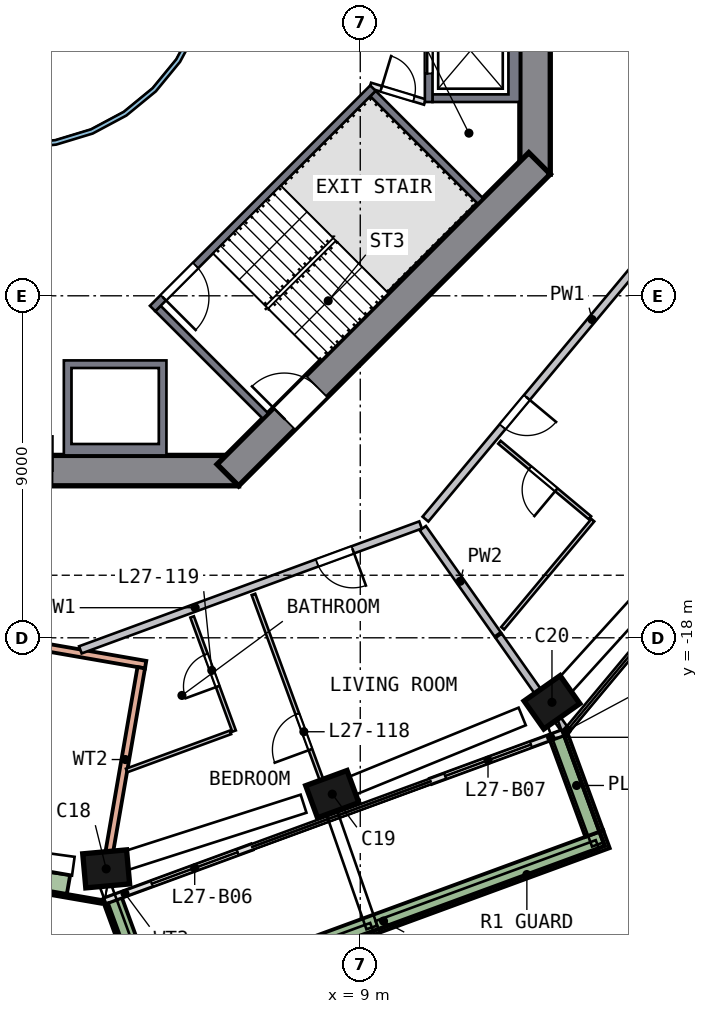
"""IFC4 building model, lengths in metres.
Left out: names, types, materials, properties, quantities, classifications, styles, units other than length and angle.
Written with IfcOpenShell. Run it as: python <this file> out.ifc"""

import sys

from ifc_helpers import new_model, si_unit, direction, frame, frame_2d, origin, origin_2d, place, context, subcontext, project, spatial, polyline, rectangle, outline, extrude, element, fill, save


model = new_model("IFC4")
c1 = context("Model", 3, precision=1e-05, world=origin(), true_north=direction((0.0, 1.0)))
c2 = subcontext(c1, "Body", "Model", "MODEL_VIEW")
j1 = project(units=[si_unit("LENGTHUNIT", "METRE"), si_unit("PLANEANGLEUNIT", "RADIAN")], contexts=[c1])
p1 = place(None, origin())
s1 = spatial("IfcSite", under=j1, at=p1, CompositionType="ELEMENT")
p2 = place(p1, origin())
s2 = spatial("IfcBuilding", under=s1, at=p2, CompositionType="ELEMENT")
p3 = place(p2, frame((0.0, 0.0, 115.0)))
s3 = spatial("IfcBuildingStorey", under=s2, at=p3, CompositionType="ELEMENT", Elevation=115.0)
p4 = place(p3, frame((2.176, -24.094, 0.0), z_axis=(0.114495653, 0.011251897, 0.993360026), x_axis=(-0.989387353, -0.088756673, 0.115043115)))
e1 = element("IfcColumn", 1, at=p4, inside=s3, PredefinedType="COLUMN", context=c2, shape_type="SweptSolid", body=[
    extrude(rectangle(XDim=1.15, YDim=0.9, at=origin_2d()), origin(), (0.0, 0.0, 1.0), 3.211),
])
p5 = place(p3, frame((8.136, -22.162, 0.0), z_axis=(0.105101688, 0.039546221, 0.993674862), x_axis=(0.932955243, 0.342030908, -0.11229146)))
e2 = element("IfcColumn", 2, at=p5, inside=s3, PredefinedType="COLUMN", context=c2, shape_type="SweptSolid", body=[
    extrude(rectangle(XDim=1.15, YDim=0.9, at=origin_2d()), origin(), (0.0, 0.0, 1.0), 3.21),
])
p6 = place(p3, frame((13.932, -19.779, 0.0), z_axis=(0.093512147, 0.067055052, 0.993357488), x_axis=(-0.812148283, -0.571992313, 0.115065024)))
e3 = element("IfcColumn", 3, at=p6, inside=s3, PredefinedType="COLUMN", context=c2, shape_type="SweptSolid", body=[
    extrude(rectangle(XDim=1.15, YDim=0.9, at=origin_2d()), origin(), (0.0, 0.0, 1.0), 3.211),
])
p7 = place(p3, frame((13.6, -5.799, 0.0), z_axis=(0.0, 0.0, 1.0), x_axis=(0.0, 1.0, 0.0)))
e4 = element("IfcWall", 4, at=p7, inside=s3, PredefinedType="SHEAR", context=c2, shape_type="SweptSolid", body=[
    extrude(rectangle(XDim=11.598, YDim=0.8, at=frame_2d((5.799, 0.0))), origin(), (0.0, 0.0, 1.0), 3.5),
])
p8 = place(p7, frame((4.899, 0.0, 0.0)))
e5 = element("IfcOpeningElement", 5, at=p8, cuts=e4, PredefinedType="OPENING", context=c2, shape_type="SweptSolid", body=[
    extrude(rectangle(XDim=1.8, YDim=2.1, at=frame_2d((0.9, 1.05))), frame((0.0, 0.41, 0.0), z_axis=(0.0, -1.0, 0.0), x_axis=(1.0, 0.0, 0.0)), (0.0, 0.0, 1.0), 0.82),
])
p9 = place(p3, frame((-5.799, -13.6, 0.0), z_axis=(0.0, 0.0, 1.0), x_axis=(1.0, 0.0, 0.0)))
e6 = element("IfcWall", 6, at=p9, inside=s3, PredefinedType="SHEAR", context=c2, shape_type="SweptSolid", body=[
    extrude(rectangle(XDim=11.598, YDim=0.8, at=frame_2d((5.799, 0.0))), origin(), (0.0, 0.0, 1.0), 3.5),
])
p10 = place(p9, frame((4.899, 0.0, 0.0)))
e7 = element("IfcOpeningElement", 7, at=p10, cuts=e6, PredefinedType="OPENING", context=c2, shape_type="SweptSolid", body=[
    extrude(rectangle(XDim=1.8, YDim=2.1, at=frame_2d((0.9, 1.05))), frame((0.0, 0.41, 0.0), z_axis=(0.0, -1.0, 0.0), x_axis=(1.0, 0.0, 0.0)), (0.0, 0.0, 1.0), 0.82),
])
p11 = place(p3, frame((5.516, -13.717, 0.0), z_axis=(0.0, 0.0, 1.0), x_axis=(0.707106781, 0.707106781, 0.0)))
e8 = element("IfcWall", 8, at=p11, inside=s3, PredefinedType="SHEAR", context=c2, shape_type="SweptSolid", body=[
    extrude(rectangle(XDim=11.598, YDim=0.8, at=frame_2d((5.799, 0.0))), origin(), (0.0, 0.0, 1.0), 3.5),
])
p12 = place(p11, frame((2.099, 0.0, 0.0)))
e9 = element("IfcOpeningElement", 9, at=p12, cuts=e8, PredefinedType="OPENING", context=c2, shape_type="SweptSolid", body=[
    extrude(rectangle(XDim=1.2, YDim=2.1, at=frame_2d((0.6, 1.05))), frame((0.0, 0.41, 0.0), z_axis=(0.0, -1.0, 0.0), x_axis=(1.0, 0.0, 0.0)), (0.0, 0.0, 1.0), 0.82),
])
p13 = place(p3, frame((2.289, -24.921, 0.0), z_axis=(0.0, 0.0, 1.0), x_axis=(0.938739223, 0.344628308, 0.0)))
e10 = element("IfcWall", 10, at=p13, inside=s3, PredefinedType="SOLIDWALL", context=c2, shape_type="SweptSolid", body=[
    extrude(rectangle(XDim=4.108, YDim=0.15, at=frame_2d((2.054, 0.0))), origin(), (0.0, 0.0, 1.0), 2.425),
])
p14 = place(p13, frame((1.308, 0.0, 0.0)))
e11 = element("IfcOpeningElement", 11, at=p14, cuts=e10, PredefinedType="OPENING", context=c2, shape_type="SweptSolid", body=[
    extrude(rectangle(XDim=2.4, YDim=2.4, at=frame_2d((1.2, 1.2))), frame((0.0, 0.085, 0.0), z_axis=(0.0, -1.0, 0.0), x_axis=(1.0, 0.0, 0.0)), (0.0, 0.0, 1.0), 0.17),
])
p15 = place(p3, frame((10.859, -21.775, 0.0), z_axis=(0.0, 0.0, 1.0), x_axis=(0.938745803, 0.344610386, 0.0)))
e12 = element("IfcWall", 12, at=p15, inside=s3, PredefinedType="SOLIDWALL", context=c2, shape_type="SweptSolid", body=[
    extrude(rectangle(XDim=3.71, YDim=0.15, at=frame_2d((1.855, 0.0))), origin(), (0.0, 0.0, 1.0), 2.425),
])
p16 = place(p15, frame((0.4, 0.0, 0.0)))
e13 = element("IfcOpeningElement", 13, at=p16, cuts=e12, PredefinedType="OPENING", context=c2, shape_type="SweptSolid", body=[
    extrude(rectangle(XDim=2.4, YDim=2.4, at=frame_2d((1.2, 1.2))), frame((0.0, 0.085, 0.0), z_axis=(0.0, -1.0, 0.0), x_axis=(1.0, 0.0, 0.0)), (0.0, 0.0, 1.0), 0.17),
])
p17 = place(p3, frame((2.494, -24.927, 0.0), z_axis=(0.0, 0.0, 1.0), x_axis=(0.344633575, -0.93873729, 0.0)))
e14 = element("IfcWall", 14, at=p17, inside=s3, PredefinedType="SOLIDWALL", context=c2, shape_type="SweptSolid", body=[
    extrude(rectangle(XDim=3.199, YDim=0.5, at=frame_2d((1.6, 0.0))), origin(), (0.0, 0.0, 1.0), 0.7),
])
p18 = place(p3, frame((3.745, -27.609, 0.0), z_axis=(0.0, 0.0, 1.0), x_axis=(0.93873799, 0.344631667, 0.0)))
e15 = element("IfcWall", 15, at=p18, inside=s3, PredefinedType="SOLIDWALL", context=c2, shape_type="SweptSolid", body=[
    extrude(rectangle(XDim=12.5, YDim=0.5, at=frame_2d((6.25, 0.0))), origin(), (0.0, 0.0, 1.0), 0.7),
])
p19 = place(p3, frame((15.158, -23.153, 0.0), z_axis=(0.0, 0.0, 1.0), x_axis=(-0.344741011, 0.93869784, 0.0)))
e16 = element("IfcWall", 16, at=p19, inside=s3, PredefinedType="SOLIDWALL", context=c2, shape_type="SweptSolid", body=[
    extrude(rectangle(XDim=2.699, YDim=0.5, at=frame_2d((1.35, 0.0))), origin(), (0.0, 0.0, 1.0), 0.7),
])
p20 = place(p3, frame((3.353, -18.707, 0.0), z_axis=(0.0, 0.0, 1.0), x_axis=(-0.985288842, 0.170897331, 0.0)))
e17 = element("IfcWall", 17, at=p20, inside=s3, PredefinedType="SOLIDWALL", context=c2, shape_type="SweptSolid", body=[
    extrude(rectangle(XDim=13.0, YDim=0.2, at=frame_2d((6.5, 0.0))), origin(), (0.0, 0.0, 1.0), 3.19),
])
p21 = place(p20, frame((5.6, 0.0, 0.0)))
e18 = element("IfcOpeningElement", 18, at=p21, cuts=e17, PredefinedType="OPENING", context=c2, shape_type="SweptSolid", body=[
    extrude(rectangle(XDim=1.8, YDim=2.4, at=frame_2d((0.9, 1.2))), frame((0.0, 0.11, 0.0), z_axis=(0.0, -1.0, 0.0), x_axis=(1.0, 0.0, 0.0)), (0.0, 0.0, 1.0), 0.22),
])
p22 = place(p3, frame((2.399, -23.62, 0.0), z_axis=(0.0, 0.0, 1.0), x_axis=(0.170910453, 0.985286566, 0.0)))
e19 = element("IfcWall", 19, at=p22, inside=s3, PredefinedType="SOLIDWALL", context=c2, shape_type="SweptSolid", body=[
    extrude(rectangle(XDim=4.904, YDim=0.2, at=frame_2d((2.452, 0.0))), origin(), (0.0, 0.0, 1.0), 3.19),
])
p23 = place(p3, frame((-10.463, -22.755, 0.0), z_axis=(0.0, 0.0, 1.0), x_axis=(0.985288688, -0.170898217, 0.0)))
e20 = element("IfcWall", 20, at=p23, inside=s3, PredefinedType="SOLIDWALL", context=c2, shape_type="SweptSolid", body=[
    extrude(rectangle(XDim=12.84, YDim=0.1, at=frame_2d((6.42, 0.0))), origin(), (0.0, 0.0, 1.0), 0.7),
])
p24 = place(p3, frame((-3.066, -23.734, 0.0), z_axis=(0.0, 0.0, 1.0), x_axis=(0.985288091, -0.170901662, 0.0)))
e21 = element("IfcWall", 21, at=p24, inside=s3, PredefinedType="SOLIDWALL", context=c2, shape_type="SweptSolid", body=[
    extrude(rectangle(XDim=4.454, YDim=0.5, at=frame_2d((2.227, 0.0))), origin(), (0.0, 0.0, 1.0), 0.7),
])
p25 = place(p3, origin())
e22 = element("IfcWall", 22, at=p25, inside=s3, PredefinedType="SOLIDWALL", context=c2, shape_type="SweptSolid", body=[
    extrude(outline(polyline([(13.2, -3.9), (10.9, -3.9), (10.9, -3.7), (12.9, -3.7), (12.9, -1.4), (10.9, -1.4), (10.9, -1.2), (13.2, -1.2), (13.2, -3.9)])), origin(), (0.0, 0.0, 1.0), 3.19),
])
p26 = place(p3, frame((10.8, -1.2, 0.0), z_axis=(0.0, 0.0, 1.0), x_axis=(0.0, -1.0, 0.0)))
e23 = element("IfcWall", 23, at=p26, inside=s3, PredefinedType="SOLIDWALL", context=c2, shape_type="SweptSolid", body=[
    extrude(rectangle(XDim=2.7, YDim=0.2, at=frame_2d((1.35, 0.0))), origin(), (0.0, 0.0, 1.0), 3.19),
])
p27 = place(p26, frame((0.75, 0.0, 0.0)))
e24 = element("IfcOpeningElement", 24, at=p27, cuts=e23, PredefinedType="OPENING", context=c2, shape_type="SweptSolid", body=[
    extrude(rectangle(XDim=1.2, YDim=2.1, at=frame_2d((0.6, 1.05))), frame((0.0, 0.11, 0.0), z_axis=(0.0, -1.0, 0.0), x_axis=(1.0, 0.0, 0.0)), (0.0, 0.0, 1.0), 0.22),
])
p28 = place(p3, origin())
e25 = element("IfcWall", 25, at=p28, inside=s3, PredefinedType="SOLIDWALL", context=c2, shape_type="SweptSolid", body=[
    extrude(outline(polyline([(3.9, -10.7), (3.9, -13.2), (1.2, -13.2), (1.2, -10.7), (3.9, -10.7)]), holes=[polyline([(1.4, -12.9), (3.7, -12.9), (3.7, -10.9), (1.4, -10.9), (1.4, -12.9)])]), origin(), (0.0, 0.0, 1.0), 3.19),
])
p29 = place(p3, frame((9.334, -3.535, 0.0), z_axis=(0.0, 0.0, 1.0), x_axis=(-0.707106781, -0.707106781, 0.0)))
e26 = element("IfcWall", 26, at=p29, inside=s3, PredefinedType="SOLIDWALL", context=c2, shape_type="SweptSolid", body=[
    extrude(rectangle(XDim=8.2, YDim=0.2, at=frame_2d((4.1, 0.0))), origin(), (0.0, 0.0, 1.0), 3.19),
])
p30 = place(p29, frame((6.6, 0.0, 0.0)))
e27 = element("IfcOpeningElement", 27, at=p30, cuts=e26, PredefinedType="OPENING", context=c2, shape_type="SweptSolid", body=[
    extrude(rectangle(XDim=1.2, YDim=2.1, at=frame_2d((0.6, 1.05))), frame((0.0, 0.11, 0.0), z_axis=(0.0, -1.0, 0.0), x_axis=(1.0, 0.0, 0.0)), (0.0, 0.0, 1.0), 0.22),
])
for number, where, z_axis, x_axis in (
    (28, (3.677, -9.334, 0.0), (0.0, 0.0, 1.0), (0.707, -0.707, 0.0)),
    (29, (9.334, -3.677, 0.0), (0.0, 0.0, 1.0), (0.707, -0.707, 0.0)),
):
    element("IfcWall", number, at=place(p3, frame(where, z_axis=z_axis, x_axis=x_axis)), inside=s3, PredefinedType="SOLIDWALL", context=c2, shape_type="SweptSolid", body=[
        extrude(rectangle(XDim=4.0, YDim=0.2, at=frame_2d((2.0, 0.0))), origin(), (0.0, 0.0, 1.0), 3.19),
    ])
p31 = place(p3, frame((9.263, -3.465, 0.0), z_axis=(0.0, 0.0, 1.0), x_axis=(0.957084567, -0.289808785, 0.0)))
e30 = element("IfcWall", 30, at=p31, inside=s3, PredefinedType="PARTITIONING", context=c2, shape_type="SweptSolid", body=[
    extrude(rectangle(XDim=1.501, YDim=0.15, at=frame_2d((0.75, 0.0))), origin(), (0.0, 0.0, 1.0), 3.19),
])
p32 = place(p31, frame((0.301, 0.0, 0.0)))
e31 = element("IfcOpeningElement", 31, at=p32, cuts=e30, PredefinedType="OPENING", context=c2, shape_type="SweptSolid", body=[
    extrude(rectangle(XDim=0.9, YDim=2.1, at=frame_2d((0.45, 1.05))), frame((0.0, 0.085, 0.0), z_axis=(0.0, -1.0, 0.0), x_axis=(1.0, 0.0, 0.0)), (0.0, 0.0, 1.0), 0.17),
])
p33 = place(p3, origin())
e32 = element("IfcWall", 32, at=p33, inside=s3, PredefinedType="SOLIDWALL", context=c2, shape_type="SweptSolid", body=[
    extrude(outline(polyline([(5.021, -0.999), (4.73, -1.959), (4.257, -2.844), (3.62, -3.62), (2.844, -4.257), (1.959, -4.73), (0.999, -5.021), (0.0, -5.12), (-0.999, -5.021), (-1.959, -4.73), (-2.844, -4.257), (-3.62, -3.62), (-4.257, -2.844), (-4.73, -1.959), (-5.021, -0.999), (-5.12, 0.0), (-5.021, 0.999), (-4.73, 1.959), (-4.257, 2.844), (-3.62, 3.62), (-2.844, 4.257), (-1.959, 4.73), (-0.999, 5.021), (0.0, 5.12), (0.999, 5.021), (1.959, 4.73), (2.844, 4.257), (3.62, 3.62), (4.257, 2.844), (4.73, 1.959), (5.021, 0.999), (5.12, 0.0), (5.021, -0.999)]), holes=[polyline([(4.904, 0.976), (4.619, 1.913), (4.157, 2.778), (3.535, 3.535), (2.778, 4.157), (1.913, 4.619), (0.976, 4.904), (0.0, 5.0), (-0.976, 4.904), (-1.913, 4.619), (-2.778, 4.157), (-3.535, 3.535), (-4.157, 2.778), (-4.619, 1.913), (-4.904, 0.976), (-5.0, 0.0), (-4.904, -0.976), (-4.619, -1.913), (-4.157, -2.778), (-3.535, -3.535), (-2.778, -4.157), (-1.913, -4.619), (-0.976, -4.904), (0.0, -5.0), (0.976, -4.904), (1.913, -4.619), (2.778, -4.157), (3.535, -3.535), (4.157, -2.778), (4.619, -1.913), (4.904, -0.976), (5.0, 0.0), (4.904, 0.976)])]), origin(), (0.0, 0.0, 1.0), 3.19),
])
p34 = place(p3, frame((10.587, -15.031, 0.0), z_axis=(0.0, 0.0, 1.0), x_axis=(-0.938738059, -0.34463148, 0.0)))
e33 = element("IfcWall", 33, at=p34, inside=s3, PredefinedType="SOLIDWALL", context=c2, shape_type="SweptSolid", body=[
    extrude(rectangle(XDim=9.537, YDim=0.2, at=frame_2d((4.768, 0.0))), origin(), (0.0, 0.0, 1.0), 3.19),
])
p35 = place(p34, frame((1.9, 0.0, 0.0)))
e34 = element("IfcOpeningElement", 34, at=p35, cuts=e33, PredefinedType="OPENING", context=c2, shape_type="SweptSolid", body=[
    extrude(rectangle(XDim=1.0, YDim=2.1, at=frame_2d((0.5, 1.05))), frame((0.0, 0.11, 0.0), z_axis=(0.0, -1.0, 0.0), x_axis=(1.0, 0.0, 0.0)), (0.0, 0.0, 1.0), 0.22),
])
p36 = place(p3, frame((16.684, -7.723, 0.0), z_axis=(0.0, 0.0, 1.0), x_axis=(-0.640640516, -0.767840953, 0.0)))
e35 = element("IfcWall", 35, at=p36, inside=s3, PredefinedType="SOLIDWALL", context=c2, shape_type="SweptSolid", body=[
    extrude(rectangle(XDim=9.316, YDim=0.2, at=frame_2d((4.658, 0.0))), origin(), (0.0, 0.0, 1.0), 3.19),
])
p37 = place(p36, frame((5.15, 0.0, 0.0)))
e36 = element("IfcOpeningElement", 36, at=p37, cuts=e35, PredefinedType="OPENING", context=c2, shape_type="SweptSolid", body=[
    extrude(rectangle(XDim=1.0, YDim=2.1, at=frame_2d((0.5, 1.05))), frame((0.0, 0.11, 0.0), z_axis=(0.0, -1.0, 0.0), x_axis=(1.0, 0.0, 0.0)), (0.0, 0.0, 1.0), 0.22),
])
p38 = place(p3, frame((10.647, -15.115, 0.0), z_axis=(0.0, 0.0, 1.0), x_axis=(0.575827703, -0.817571071, 0.0)))
e37 = element("IfcWall", 37, at=p38, inside=s3, PredefinedType="SOLIDWALL", context=c2, shape_type="SweptSolid", body=[
    extrude(rectangle(XDim=3.418, YDim=0.2, at=frame_2d((1.709, 0.0))), origin(), (0.0, 0.0, 1.0), 3.19),
])
p39 = place(p3, frame((12.642, -17.947, 0.0), z_axis=(0.0, 0.0, 1.0), x_axis=(0.575919056, -0.817506723, 0.0)))
e38 = element("IfcWall", 38, at=p39, inside=s3, PredefinedType="SOLIDWALL", context=c2, shape_type="SweptSolid", body=[
    extrude(rectangle(XDim=3.011, YDim=0.2, at=frame_2d((1.506, 0.0))), origin(), (0.0, 0.0, 1.0), 3.19),
])
p40 = place(p3, frame((2.852, -21.492, 0.0), z_axis=(0.0, 0.0, 1.0), x_axis=(0.938746168, 0.344609392, 0.0)))
e39 = element("IfcWall", 39, at=p40, inside=s3, PredefinedType="PARTITIONING", context=c2, shape_type="SweptSolid", body=[
    extrude(rectangle(XDim=2.912, YDim=0.1, at=frame_2d((1.456, 0.0))), origin(), (0.0, 0.0, 1.0), 3.19),
])
p41 = place(p3, frame((5.679, -20.454, 0.0), z_axis=(0.0, 0.0, 1.0), x_axis=(-0.344602078, 0.938748852, 0.0)))
e40 = element("IfcWall", 40, at=p41, inside=s3, PredefinedType="PARTITIONING", context=c2, shape_type="SweptSolid", body=[
    extrude(rectangle(XDim=3.2, YDim=0.1, at=frame_2d((1.6, 0.0))), origin(), (0.0, 0.0, 1.0), 3.19),
])
p42 = place(p41, frame((1.25, 0.0, 0.0)))
e41 = element("IfcOpeningElement", 41, at=p42, cuts=e40, PredefinedType="OPENING", context=c2, shape_type="SweptSolid", body=[
    extrude(rectangle(XDim=0.9, YDim=2.1, at=frame_2d((0.45, 1.05))), frame((0.0, 0.06, 0.0), z_axis=(0.0, -1.0, 0.0), x_axis=(1.0, 0.0, 0.0)), (0.0, 0.0, 1.0), 0.12),
])
p43 = place(p3, frame((8.309, -22.631, 0.0), z_axis=(0.0, 0.0, 1.0), x_axis=(-0.344654705, 0.938729532, 0.0)))
e42 = element("IfcWall", 42, at=p43, inside=s3, PredefinedType="PARTITIONING", context=c2, shape_type="SweptSolid", body=[
    extrude(rectangle(XDim=6.15, YDim=0.1, at=frame_2d((3.075, 0.0))), origin(), (0.0, 0.0, 1.0), 3.19),
])
p44 = place(p43, frame((1.8, 0.0, 0.0)))
e43 = element("IfcOpeningElement", 43, at=p44, cuts=e42, PredefinedType="OPENING", context=c2, shape_type="SweptSolid", body=[
    extrude(rectangle(XDim=1.0, YDim=2.1, at=frame_2d((0.5, 1.05))), frame((0.0, 0.06, 0.0), z_axis=(0.0, -1.0, 0.0), x_axis=(1.0, 0.0, 0.0)), (0.0, 0.0, 1.0), 0.12),
])
p45 = place(p3, frame((15.043, -14.841, 0.0), z_axis=(0.0, 0.0, 1.0), x_axis=(-0.767833833, 0.64064905, 0.0)))
e44 = element("IfcWall", 44, at=p45, inside=s3, PredefinedType="PARTITIONING", context=c2, shape_type="SweptSolid", body=[
    extrude(rectangle(XDim=3.1, YDim=0.1, at=frame_2d((1.55, 0.0))), origin(), (0.0, 0.0, 1.0), 3.19),
])
p46 = place(p45, frame((1.15, 0.0, 0.0)))
e45 = element("IfcOpeningElement", 45, at=p46, cuts=e44, PredefinedType="OPENING", context=c2, shape_type="SweptSolid", body=[
    extrude(rectangle(XDim=0.9, YDim=2.1, at=frame_2d((0.45, 1.05))), frame((0.0, 0.06, 0.0), z_axis=(0.0, -1.0, 0.0), x_axis=(1.0, 0.0, 0.0)), (0.0, 0.0, 1.0), 0.12),
])
p47 = place(p3, frame((15.12, -14.905, 0.0), z_axis=(0.0, 0.0, 1.0), x_axis=(-0.640638089, -0.767842978, 0.0)))
e46 = element("IfcWall", 46, at=p47, inside=s3, PredefinedType="PARTITIONING", context=c2, shape_type="SweptSolid", body=[
    extrude(rectangle(XDim=3.704, YDim=0.1, at=frame_2d((1.852, 0.0))), origin(), (0.0, 0.0, 1.0), 3.19),
])
p48 = place(p14, origin())
e47 = element("IfcDoor", 47, at=p48, inside=s3, OperationType="SLIDING_TO_LEFT", PredefinedType="DOOR", context=c2, shape_type="SweptSolid", body=[
    extrude(rectangle(XDim=2.4, YDim=2.4, at=frame_2d((1.2, 1.2))), frame((0.0, 0.025, 0.0), z_axis=(0.0, -1.0, 0.0), x_axis=(1.0, 0.0, 0.0)), (0.0, 0.0, 1.0), 0.05),
])
fill(e11, e47)
p49 = place(p16, origin())
e48 = element("IfcDoor", 48, at=p49, inside=s3, OperationType="SLIDING_TO_RIGHT", PredefinedType="DOOR", context=c2, shape_type="SweptSolid", body=[
    extrude(rectangle(XDim=2.4, YDim=2.4, at=frame_2d((1.2, 1.2))), frame((0.0, 0.025, 0.0), z_axis=(0.0, -1.0, 0.0), x_axis=(1.0, 0.0, 0.0)), (0.0, 0.0, 1.0), 0.05),
])
fill(e13, e48)
p50 = place(p27, origin())
e49 = element("IfcDoor", 49, at=p50, inside=s3, OperationType="DOUBLE_DOOR_SLIDING", PredefinedType="DOOR", context=c2, shape_type="SweptSolid", body=[
    extrude(rectangle(XDim=1.2, YDim=2.1, at=frame_2d((0.6, 1.05))), frame((0.0, 0.025, 0.0), z_axis=(0.0, -1.0, 0.0), x_axis=(1.0, 0.0, 0.0)), (0.0, 0.0, 1.0), 0.05),
])
fill(e24, e49)
p51 = place(p30, origin())
e50 = element("IfcDoor", 50, at=p51, inside=s3, OperationType="SINGLE_SWING_RIGHT", PredefinedType="DOOR", context=c2, shape_type="SweptSolid", body=[
    extrude(rectangle(XDim=1.2, YDim=2.1, at=frame_2d((0.6, 1.05))), frame((0.0, 0.025, 0.0), z_axis=(0.0, -1.0, 0.0), x_axis=(1.0, 0.0, 0.0)), (0.0, 0.0, 1.0), 0.05),
])
fill(e27, e50)
p52 = place(p10, origin())
e51 = element("IfcDoor", 51, at=p52, inside=s3, OperationType="DOUBLE_DOOR_SINGLE_SWING", PredefinedType="DOOR", context=c2, shape_type="SweptSolid", body=[
    extrude(rectangle(XDim=1.8, YDim=2.1, at=frame_2d((0.9, 1.05))), frame((0.0, 0.025, 0.0), z_axis=(0.0, -1.0, 0.0), x_axis=(1.0, 0.0, 0.0)), (0.0, 0.0, 1.0), 0.05),
])
fill(e7, e51)
p53 = place(p12, origin())
e52 = element("IfcDoor", 52, at=p53, inside=s3, OperationType="SINGLE_SWING_LEFT", PredefinedType="DOOR", context=c2, shape_type="SweptSolid", body=[
    extrude(rectangle(XDim=1.2, YDim=2.1, at=frame_2d((0.6, 1.05))), frame((0.0, 0.025, 0.0), z_axis=(0.0, -1.0, 0.0), x_axis=(1.0, 0.0, 0.0)), (0.0, 0.0, 1.0), 0.05),
])
fill(e9, e52)
p54 = place(p32, origin())
e53 = element("IfcDoor", 53, at=p54, inside=s3, OperationType="SINGLE_SWING_LEFT", PredefinedType="DOOR", context=c2, shape_type="SweptSolid", body=[
    extrude(rectangle(XDim=0.9, YDim=2.1, at=frame_2d((0.45, 1.05))), frame((0.0, 0.025, 0.0), z_axis=(0.0, -1.0, 0.0), x_axis=(1.0, 0.0, 0.0)), (0.0, 0.0, 1.0), 0.05),
])
fill(e31, e53)
p55 = place(p35, origin())
e54 = element("IfcDoor", 54, at=p55, inside=s3, OperationType="SINGLE_SWING_LEFT", PredefinedType="DOOR", context=c2, shape_type="SweptSolid", body=[
    extrude(rectangle(XDim=1.0, YDim=2.1, at=frame_2d((0.5, 1.05))), frame((0.0, 0.025, 0.0), z_axis=(0.0, -1.0, 0.0), x_axis=(1.0, 0.0, 0.0)), (0.0, 0.0, 1.0), 0.05),
])
fill(e34, e54)
p56 = place(p44, origin())
e55 = element("IfcDoor", 55, at=p56, inside=s3, OperationType="SINGLE_SWING_LEFT", PredefinedType="DOOR", context=c2, shape_type="SweptSolid", body=[
    extrude(rectangle(XDim=1.0, YDim=2.1, at=frame_2d((0.5, 1.05))), frame((0.0, 0.025, 0.0), z_axis=(0.0, -1.0, 0.0), x_axis=(1.0, 0.0, 0.0)), (0.0, 0.0, 1.0), 0.05),
])
fill(e43, e55)
p57 = place(p42, origin())
e56 = element("IfcDoor", 56, at=p57, inside=s3, OperationType="SINGLE_SWING_LEFT", PredefinedType="DOOR", context=c2, shape_type="SweptSolid", body=[
    extrude(rectangle(XDim=0.9, YDim=2.1, at=frame_2d((0.45, 1.05))), frame((0.0, 0.025, 0.0), z_axis=(0.0, -1.0, 0.0), x_axis=(1.0, 0.0, 0.0)), (0.0, 0.0, 1.0), 0.05),
])
fill(e41, e56)
p58 = place(p37, origin())
e57 = element("IfcDoor", 57, at=p58, inside=s3, OperationType="SINGLE_SWING_LEFT", PredefinedType="DOOR", context=c2, shape_type="SweptSolid", body=[
    extrude(rectangle(XDim=1.0, YDim=2.1, at=frame_2d((0.5, 1.05))), frame((0.0, 0.025, 0.0), z_axis=(0.0, -1.0, 0.0), x_axis=(1.0, 0.0, 0.0)), (0.0, 0.0, 1.0), 0.05),
])
fill(e36, e57)
p59 = place(p46, origin())
e58 = element("IfcDoor", 58, at=p59, inside=s3, OperationType="SINGLE_SWING_LEFT", PredefinedType="DOOR", context=c2, shape_type="SweptSolid", body=[
    extrude(rectangle(XDim=0.9, YDim=2.1, at=frame_2d((0.45, 1.05))), frame((0.0, 0.025, 0.0), z_axis=(0.0, -1.0, 0.0), x_axis=(1.0, 0.0, 0.0)), (0.0, 0.0, 1.0), 0.05),
])
fill(e45, e58)
save(model, sys.argv[1])
